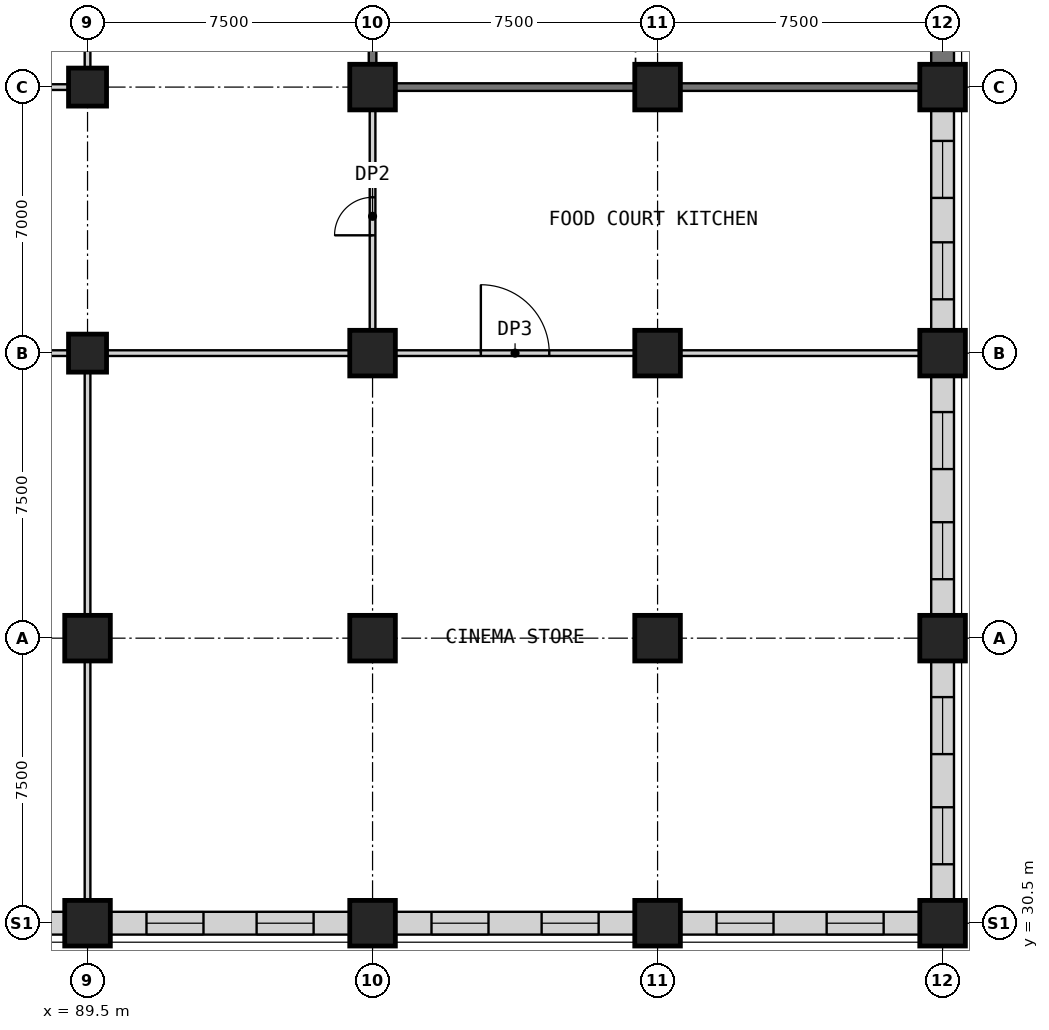
"""IFC4 building model, lengths in metres.
Left out: names, types, materials, properties, quantities, classifications, styles, units other than length and angle.
Written with IfcOpenShell. Run it as: python <this file> out.ifc"""

import sys

from ifc_helpers import new_model, si_unit, direction, frame, frame_2d, origin, origin_2d, place, context, subcontext, project, spatial, rectangle, extrude, element, fill, save


model = new_model("IFC4")
c1 = context("Model", 3, precision=1e-05, world=origin(), true_north=direction((0.0, 1.0)))
c2 = subcontext(c1, "Body", "Model", "MODEL_VIEW")
j1 = project(units=[si_unit("LENGTHUNIT", "METRE"), si_unit("PLANEANGLEUNIT", "RADIAN")], contexts=[c1])
p1 = place(None, origin())
s1 = spatial("IfcSite", under=j1, at=p1, CompositionType="ELEMENT")
p2 = place(p1, origin())
s2 = spatial("IfcBuilding", under=s1, at=p2, CompositionType="ELEMENT")
p3 = place(p2, frame((0.0, 0.0, 18.5)))
s3 = spatial("IfcBuildingStorey", under=s2, at=p3, CompositionType="ELEMENT", Elevation=18.5)
for number, where, z_axis, x_axis in (
    (1, (89.5, 45.5, 0.0), (0.0, 0.0, 1.0), (1.0, 0.0, 0.0)),
    (2, (89.5, 52.5, 0.0), (0.0, 0.0, 1.0), (1.0, 0.0, 0.0)),
):
    element("IfcColumn", number, at=place(p3, frame(where, z_axis=z_axis, x_axis=x_axis)), inside=s3, PredefinedType="COLUMN", context=c2, shape_type="SweptSolid", body=[
        extrude(rectangle(XDim=1.0, YDim=1.0, at=origin_2d()), origin(), (0.0, 0.0, 1.0), 5.0),
    ])
for number, where, z_axis, x_axis in (
    (3, (89.5, 30.5, 0.0), (0.0, 0.0, 1.0), (1.0, 0.0, 0.0)),
    (4, (89.5, 38.0, 0.0), (0.0, 0.0, 1.0), (1.0, 0.0, 0.0)),
    (5, (97.0, 30.5, 0.0), (0.0, 0.0, 1.0), (1.0, 0.0, 0.0)),
    (6, (97.0, 38.0, 0.0), (0.0, 0.0, 1.0), (1.0, 0.0, 0.0)),
    (7, (97.0, 45.5, 0.0), (0.0, 0.0, 1.0), (1.0, 0.0, 0.0)),
    (8, (97.0, 52.5, 0.0), (0.0, 0.0, 1.0), (1.0, 0.0, 0.0)),
    (9, (104.5, 30.5, 0.0), (0.0, 0.0, 1.0), (1.0, 0.0, 0.0)),
    (10, (104.5, 38.0, 0.0), (0.0, 0.0, 1.0), (1.0, 0.0, 0.0)),
    (11, (104.5, 45.5, 0.0), (0.0, 0.0, 1.0), (1.0, 0.0, 0.0)),
    (12, (104.5, 52.5, 0.0), (0.0, 0.0, 1.0), (1.0, 0.0, 0.0)),
    (13, (112.0, 30.5, 0.0), (0.0, 0.0, 1.0), (1.0, 0.0, 0.0)),
    (14, (112.0, 38.0, 0.0), (0.0, 0.0, 1.0), (1.0, 0.0, 0.0)),
    (15, (112.0, 45.5, 0.0), (0.0, 0.0, 1.0), (1.0, 0.0, 0.0)),
    (16, (112.0, 52.5, 0.0), (0.0, 0.0, 1.0), (1.0, 0.0, 0.0)),
):
    element("IfcColumn", number, at=place(p3, frame(where, z_axis=z_axis, x_axis=x_axis)), inside=s3, PredefinedType="COLUMN", context=c2, shape_type="SweptSolid", body=[
        extrude(rectangle(XDim=1.2, YDim=1.2, at=origin_2d()), origin(), (0.0, 0.0, 1.0), 5.0),
    ])
p4 = place(p3, frame((82.6, 30.5, 0.0), z_axis=(0.0, 0.0, 1.0), x_axis=(1.0, 0.0, 0.0)))
e17 = element("IfcWall", 17, at=p4, inside=s3, PredefinedType="PARTITIONING", context=c2, shape_type="SweptSolid", body=[
    extrude(rectangle(XDim=6.3, YDim=0.6, at=frame_2d((3.15, 0.0))), origin(), (0.0, 0.0, 1.0), 4.1),
])
p5 = place(p4, frame((0.951, 0.0, 0.9)))
e18 = element("IfcOpeningElement", 18, at=p5, cuts=e17, PredefinedType="OPENING", context=c2, shape_type="SweptSolid", body=[
    extrude(rectangle(XDim=1.5, YDim=2.8, at=frame_2d((0.75, 1.4))), frame((0.0, 0.31, 0.0), z_axis=(0.0, -1.0, 0.0), x_axis=(1.0, 0.0, 0.0)), (0.0, 0.0, 1.0), 0.62),
])
p6 = place(p4, frame((3.849, 0.0, 0.9)))
e19 = element("IfcOpeningElement", 19, at=p6, cuts=e17, PredefinedType="OPENING", context=c2, shape_type="SweptSolid", body=[
    extrude(rectangle(XDim=1.5, YDim=2.8, at=frame_2d((0.75, 1.4))), frame((0.0, 0.31, 0.0), z_axis=(0.0, -1.0, 0.0), x_axis=(1.0, 0.0, 0.0)), (0.0, 0.0, 1.0), 0.62),
])
p7 = place(p3, frame((90.1, 30.5, 0.0), z_axis=(0.0, 0.0, 1.0), x_axis=(1.0, 0.0, 0.0)))
e20 = element("IfcWall", 20, at=p7, inside=s3, PredefinedType="PARTITIONING", context=c2, shape_type="SweptSolid", body=[
    extrude(rectangle(XDim=6.3, YDim=0.6, at=frame_2d((3.15, 0.0))), origin(), (0.0, 0.0, 1.0), 4.1),
])
p8 = place(p7, frame((0.951, 0.0, 0.9)))
e21 = element("IfcOpeningElement", 21, at=p8, cuts=e20, PredefinedType="OPENING", context=c2, shape_type="SweptSolid", body=[
    extrude(rectangle(XDim=1.5, YDim=2.8, at=frame_2d((0.75, 1.4))), frame((0.0, 0.31, 0.0), z_axis=(0.0, -1.0, 0.0), x_axis=(1.0, 0.0, 0.0)), (0.0, 0.0, 1.0), 0.62),
])
p9 = place(p7, frame((3.849, 0.0, 0.9)))
e22 = element("IfcOpeningElement", 22, at=p9, cuts=e20, PredefinedType="OPENING", context=c2, shape_type="SweptSolid", body=[
    extrude(rectangle(XDim=1.5, YDim=2.8, at=frame_2d((0.75, 1.4))), frame((0.0, 0.31, 0.0), z_axis=(0.0, -1.0, 0.0), x_axis=(1.0, 0.0, 0.0)), (0.0, 0.0, 1.0), 0.62),
])
p10 = place(p3, frame((97.6, 30.5, 0.0), z_axis=(0.0, 0.0, 1.0), x_axis=(1.0, 0.0, 0.0)))
e23 = element("IfcWall", 23, at=p10, inside=s3, PredefinedType="PARTITIONING", context=c2, shape_type="SweptSolid", body=[
    extrude(rectangle(XDim=6.3, YDim=0.6, at=frame_2d((3.15, 0.0))), origin(), (0.0, 0.0, 1.0), 4.1),
])
p11 = place(p10, frame((0.951, 0.0, 0.9)))
e24 = element("IfcOpeningElement", 24, at=p11, cuts=e23, PredefinedType="OPENING", context=c2, shape_type="SweptSolid", body=[
    extrude(rectangle(XDim=1.5, YDim=2.8, at=frame_2d((0.75, 1.4))), frame((0.0, 0.31, 0.0), z_axis=(0.0, -1.0, 0.0), x_axis=(1.0, 0.0, 0.0)), (0.0, 0.0, 1.0), 0.62),
])
p12 = place(p10, frame((3.849, 0.0, 0.9)))
e25 = element("IfcOpeningElement", 25, at=p12, cuts=e23, PredefinedType="OPENING", context=c2, shape_type="SweptSolid", body=[
    extrude(rectangle(XDim=1.5, YDim=2.8, at=frame_2d((0.75, 1.4))), frame((0.0, 0.31, 0.0), z_axis=(0.0, -1.0, 0.0), x_axis=(1.0, 0.0, 0.0)), (0.0, 0.0, 1.0), 0.62),
])
p13 = place(p3, frame((105.1, 30.5, 0.0), z_axis=(0.0, 0.0, 1.0), x_axis=(1.0, 0.0, 0.0)))
e26 = element("IfcWall", 26, at=p13, inside=s3, PredefinedType="PARTITIONING", context=c2, shape_type="SweptSolid", body=[
    extrude(rectangle(XDim=6.3, YDim=0.6, at=frame_2d((3.15, 0.0))), origin(), (0.0, 0.0, 1.0), 4.1),
])
p14 = place(p13, frame((0.951, 0.0, 0.9)))
e27 = element("IfcOpeningElement", 27, at=p14, cuts=e26, PredefinedType="OPENING", context=c2, shape_type="SweptSolid", body=[
    extrude(rectangle(XDim=1.5, YDim=2.8, at=frame_2d((0.75, 1.4))), frame((0.0, 0.31, 0.0), z_axis=(0.0, -1.0, 0.0), x_axis=(1.0, 0.0, 0.0)), (0.0, 0.0, 1.0), 0.62),
])
p15 = place(p13, frame((3.849, 0.0, 0.9)))
e28 = element("IfcOpeningElement", 28, at=p15, cuts=e26, PredefinedType="OPENING", context=c2, shape_type="SweptSolid", body=[
    extrude(rectangle(XDim=1.5, YDim=2.8, at=frame_2d((0.75, 1.4))), frame((0.0, 0.31, 0.0), z_axis=(0.0, -1.0, 0.0), x_axis=(1.0, 0.0, 0.0)), (0.0, 0.0, 1.0), 0.62),
])
for number, where, z_axis, x_axis in (
    (29, (82.6, 45.5, 0.0), (0.0, 0.0, 1.0), (1.0, 0.0, 0.0)),
    (30, (90.0, 45.5, 0.0), (0.0, 0.0, 1.0), (1.0, 0.0, 0.0)),
):
    element("IfcWall", number, at=place(p3, frame(where, z_axis=z_axis, x_axis=x_axis)), inside=s3, PredefinedType="PARTITIONING", context=c2, shape_type="SweptSolid", body=[
        extrude(rectangle(XDim=6.4, YDim=0.15, at=frame_2d((3.2, 0.0))), origin(), (0.0, 0.0, 1.0), 4.7),
    ])
p16 = place(p3, frame((97.6, 45.5, 0.0), z_axis=(0.0, 0.0, 1.0), x_axis=(1.0, 0.0, 0.0)))
e31 = element("IfcWall", 31, at=p16, inside=s3, PredefinedType="PARTITIONING", context=c2, shape_type="SweptSolid", body=[
    extrude(rectangle(XDim=6.3, YDim=0.15, at=frame_2d((3.15, 0.0))), origin(), (0.0, 0.0, 1.0), 4.7),
])
p17 = place(p16, frame((2.25, 0.0, 0.0)))
e32 = element("IfcOpeningElement", 32, at=p17, cuts=e31, PredefinedType="OPENING", context=c2, shape_type="SweptSolid", body=[
    extrude(rectangle(XDim=1.8, YDim=2.4, at=frame_2d((0.9, 1.2))), frame((0.0, 0.085, 0.0), z_axis=(0.0, -1.0, 0.0), x_axis=(1.0, 0.0, 0.0)), (0.0, 0.0, 1.0), 0.17),
])
p18 = place(p3, frame((105.1, 45.5, 0.0), z_axis=(0.0, 0.0, 1.0), x_axis=(1.0, 0.0, 0.0)))
e33 = element("IfcWall", 33, at=p18, inside=s3, PredefinedType="PARTITIONING", context=c2, shape_type="SweptSolid", body=[
    extrude(rectangle(XDim=6.3, YDim=0.15, at=frame_2d((3.15, 0.0))), origin(), (0.0, 0.0, 1.0), 4.7),
])
p19 = place(p3, frame((89.0, 52.5, 0.0), z_axis=(0.0, 0.0, 1.0), x_axis=(-1.0, 0.0, 0.0)))
e34 = element("IfcWall", 34, at=p19, inside=s3, PredefinedType="PARTITIONING", context=c2, shape_type="SweptSolid", body=[
    extrude(rectangle(XDim=6.4, YDim=0.15, at=frame_2d((3.2, 0.0))), origin(), (0.0, 0.0, 1.0), 4.7),
])
p20 = place(p19, frame((4.1, 0.0, 0.0)))
e35 = element("IfcOpeningElement", 35, at=p20, cuts=e34, PredefinedType="OPENING", context=c2, shape_type="SweptSolid", body=[
    extrude(rectangle(XDim=1.8, YDim=2.4, at=frame_2d((0.9, 1.2))), frame((0.0, 0.085, 0.0), z_axis=(0.0, -1.0, 0.0), x_axis=(1.0, 0.0, 0.0)), (0.0, 0.0, 1.0), 0.17),
])
for number, where, z_axis, x_axis in (
    (36, (97.6, 52.5, 0.0), (0.0, 0.0, 1.0), (1.0, 0.0, 0.0)),
    (37, (105.1, 52.5, 0.0), (0.0, 0.0, 1.0), (1.0, 0.0, 0.0)),
):
    element("IfcWall", number, at=place(p3, frame(where, z_axis=z_axis, x_axis=x_axis)), inside=s3, PredefinedType="SHEAR", context=c2, shape_type="SweptSolid", body=[
        extrude(rectangle(XDim=6.3, YDim=0.2, at=frame_2d((3.15, 0.0))), origin(), (0.0, 0.0, 1.0), 4.7),
    ])
p21 = place(p3, frame((97.0, 46.1, 0.0), z_axis=(0.0, 0.0, 1.0), x_axis=(0.0, 1.0, 0.0)))
e38 = element("IfcWall", 38, at=p21, inside=s3, PredefinedType="PARTITIONING", context=c2, shape_type="SweptSolid", body=[
    extrude(rectangle(XDim=5.8, YDim=0.15, at=frame_2d((2.9, 0.0))), origin(), (0.0, 0.0, 1.0), 4.7),
])
p22 = place(p21, frame((2.5, 0.0, 0.0)))
e39 = element("IfcOpeningElement", 39, at=p22, cuts=e38, PredefinedType="OPENING", context=c2, shape_type="SweptSolid", body=[
    extrude(rectangle(XDim=1.0, YDim=2.1, at=frame_2d((0.5, 1.05))), frame((0.0, 0.085, 0.0), z_axis=(0.0, -1.0, 0.0), x_axis=(1.0, 0.0, 0.0)), (0.0, 0.0, 1.0), 0.17),
])
p23 = place(p3, frame((97.0, 59.4, 0.0), z_axis=(0.0, 0.0, 1.0), x_axis=(0.0, -1.0, 0.0)))
e40 = element("IfcWall", 40, at=p23, inside=s3, PredefinedType="SHEAR", context=c2, shape_type="SweptSolid", body=[
    extrude(rectangle(XDim=6.3, YDim=0.2, at=frame_2d((3.15, 0.0))), origin(), (0.0, 0.0, 1.0), 4.7),
])
p24 = place(p23, frame((2.6, 0.0, 0.0)))
e41 = element("IfcOpeningElement", 41, at=p24, cuts=e40, PredefinedType="OPENING", context=c2, shape_type="SweptSolid", body=[
    extrude(rectangle(XDim=1.2, YDim=2.1, at=frame_2d((0.6, 1.05))), frame((0.0, 0.11, 0.0), z_axis=(0.0, -1.0, 0.0), x_axis=(1.0, 0.0, 0.0)), (0.0, 0.0, 1.0), 0.22),
])
p25 = place(p3, frame((112.0, 31.1, 0.0), z_axis=(0.0, 0.0, 1.0), x_axis=(0.0, 1.0, 0.0)))
e42 = element("IfcWall", 42, at=p25, inside=s3, PredefinedType="PARTITIONING", context=c2, shape_type="SweptSolid", body=[
    extrude(rectangle(XDim=6.3, YDim=0.6, at=frame_2d((3.15, 0.0))), origin(), (0.0, 0.0, 1.0), 4.1),
])
p26 = place(p25, frame((0.951, 0.0, 0.9)))
e43 = element("IfcOpeningElement", 43, at=p26, cuts=e42, PredefinedType="OPENING", context=c2, shape_type="SweptSolid", body=[
    extrude(rectangle(XDim=1.5, YDim=2.8, at=frame_2d((0.75, 1.4))), frame((0.0, 0.31, 0.0), z_axis=(0.0, -1.0, 0.0), x_axis=(1.0, 0.0, 0.0)), (0.0, 0.0, 1.0), 0.62),
])
p27 = place(p25, frame((3.849, 0.0, 0.9)))
e44 = element("IfcOpeningElement", 44, at=p27, cuts=e42, PredefinedType="OPENING", context=c2, shape_type="SweptSolid", body=[
    extrude(rectangle(XDim=1.5, YDim=2.8, at=frame_2d((0.75, 1.4))), frame((0.0, 0.31, 0.0), z_axis=(0.0, -1.0, 0.0), x_axis=(1.0, 0.0, 0.0)), (0.0, 0.0, 1.0), 0.62),
])
p28 = place(p3, frame((112.0, 38.6, 0.0), z_axis=(0.0, 0.0, 1.0), x_axis=(0.0, 1.0, 0.0)))
e45 = element("IfcWall", 45, at=p28, inside=s3, PredefinedType="PARTITIONING", context=c2, shape_type="SweptSolid", body=[
    extrude(rectangle(XDim=6.3, YDim=0.6, at=frame_2d((3.15, 0.0))), origin(), (0.0, 0.0, 1.0), 4.1),
])
p29 = place(p28, frame((0.951, 0.0, 0.9)))
e46 = element("IfcOpeningElement", 46, at=p29, cuts=e45, PredefinedType="OPENING", context=c2, shape_type="SweptSolid", body=[
    extrude(rectangle(XDim=1.5, YDim=2.8, at=frame_2d((0.75, 1.4))), frame((0.0, 0.31, 0.0), z_axis=(0.0, -1.0, 0.0), x_axis=(1.0, 0.0, 0.0)), (0.0, 0.0, 1.0), 0.62),
])
p30 = place(p28, frame((3.849, 0.0, 0.9)))
e47 = element("IfcOpeningElement", 47, at=p30, cuts=e45, PredefinedType="OPENING", context=c2, shape_type="SweptSolid", body=[
    extrude(rectangle(XDim=1.5, YDim=2.8, at=frame_2d((0.75, 1.4))), frame((0.0, 0.31, 0.0), z_axis=(0.0, -1.0, 0.0), x_axis=(1.0, 0.0, 0.0)), (0.0, 0.0, 1.0), 0.62),
])
p31 = place(p3, frame((112.0, 46.1, 0.0), z_axis=(0.0, 0.0, 1.0), x_axis=(0.0, 1.0, 0.0)))
e48 = element("IfcWall", 48, at=p31, inside=s3, PredefinedType="PARTITIONING", context=c2, shape_type="SweptSolid", body=[
    extrude(rectangle(XDim=5.8, YDim=0.6, at=frame_2d((2.9, 0.0))), origin(), (0.0, 0.0, 1.0), 4.1),
])
p32 = place(p31, frame((0.816, 0.0, 0.9)))
e49 = element("IfcOpeningElement", 49, at=p32, cuts=e48, PredefinedType="OPENING", context=c2, shape_type="SweptSolid", body=[
    extrude(rectangle(XDim=1.5, YDim=2.8, at=frame_2d((0.75, 1.4))), frame((0.0, 0.31, 0.0), z_axis=(0.0, -1.0, 0.0), x_axis=(1.0, 0.0, 0.0)), (0.0, 0.0, 1.0), 0.62),
])
p33 = place(p31, frame((3.484, 0.0, 0.9)))
e50 = element("IfcOpeningElement", 50, at=p33, cuts=e48, PredefinedType="OPENING", context=c2, shape_type="SweptSolid", body=[
    extrude(rectangle(XDim=1.5, YDim=2.8, at=frame_2d((0.75, 1.4))), frame((0.0, 0.31, 0.0), z_axis=(0.0, -1.0, 0.0), x_axis=(1.0, 0.0, 0.0)), (0.0, 0.0, 1.0), 0.62),
])
p34 = place(p3, frame((112.0, 53.1, 0.0), z_axis=(0.0, 0.0, 1.0), x_axis=(0.0, 1.0, 0.0)))
e51 = element("IfcWall", 51, at=p34, inside=s3, PredefinedType="PARTITIONING", context=c2, shape_type="SweptSolid", body=[
    extrude(rectangle(XDim=6.3, YDim=0.6, at=frame_2d((3.15, 0.0))), origin(), (0.0, 0.0, 1.0), 4.1),
])
p35 = place(p3, frame((89.5, 31.1, 0.0), z_axis=(0.0, 0.0, 1.0), x_axis=(0.0, 1.0, 0.0)))
e52 = element("IfcWall", 52, at=p35, inside=s3, PredefinedType="PARTITIONING", context=c2, shape_type="SweptSolid", body=[
    extrude(rectangle(XDim=6.3, YDim=0.15, at=frame_2d((3.15, 0.0))), origin(), (0.0, 0.0, 1.0), 4.7),
])
p36 = place(p3, frame((89.5, 38.6, 0.0), z_axis=(0.0, 0.0, 1.0), x_axis=(0.0, 1.0, 0.0)))
e53 = element("IfcWall", 53, at=p36, inside=s3, PredefinedType="PARTITIONING", context=c2, shape_type="SweptSolid", body=[
    extrude(rectangle(XDim=6.4, YDim=0.15, at=frame_2d((3.2, 0.0))), origin(), (0.0, 0.0, 1.0), 4.7),
])
p37 = place(p3, frame((89.5, 53.0, 0.0), z_axis=(0.0, 0.0, 1.0), x_axis=(0.0, 1.0, 0.0)))
e54 = element("IfcWall", 54, at=p37, inside=s3, PredefinedType="PARTITIONING", context=c2, shape_type="SweptSolid", body=[
    extrude(rectangle(XDim=6.5, YDim=0.15, at=frame_2d((3.25, 0.0))), origin(), (0.0, 0.0, 1.0), 4.7),
])
p38 = place(p8, origin())
e55 = element("IfcWindow", 55, at=p38, inside=s3, PartitioningType="SINGLE_PANEL", PredefinedType="WINDOW", context=c2, shape_type="SweptSolid", body=[
    extrude(rectangle(XDim=1.5, YDim=2.8, at=frame_2d((0.75, 1.4))), frame((0.0, 0.03, 0.0), z_axis=(0.0, -1.0, 0.0), x_axis=(1.0, 0.0, 0.0)), (0.0, 0.0, 1.0), 0.06),
])
fill(e21, e55)
p39 = place(p9, origin())
e56 = element("IfcWindow", 56, at=p39, inside=s3, PartitioningType="SINGLE_PANEL", PredefinedType="WINDOW", context=c2, shape_type="SweptSolid", body=[
    extrude(rectangle(XDim=1.5, YDim=2.8, at=frame_2d((0.75, 1.4))), frame((0.0, 0.03, 0.0), z_axis=(0.0, -1.0, 0.0), x_axis=(1.0, 0.0, 0.0)), (0.0, 0.0, 1.0), 0.06),
])
fill(e22, e56)
p40 = place(p11, origin())
e57 = element("IfcWindow", 57, at=p40, inside=s3, PartitioningType="SINGLE_PANEL", PredefinedType="WINDOW", context=c2, shape_type="SweptSolid", body=[
    extrude(rectangle(XDim=1.5, YDim=2.8, at=frame_2d((0.75, 1.4))), frame((0.0, 0.03, 0.0), z_axis=(0.0, -1.0, 0.0), x_axis=(1.0, 0.0, 0.0)), (0.0, 0.0, 1.0), 0.06),
])
fill(e24, e57)
p41 = place(p12, origin())
e58 = element("IfcWindow", 58, at=p41, inside=s3, PartitioningType="SINGLE_PANEL", PredefinedType="WINDOW", context=c2, shape_type="SweptSolid", body=[
    extrude(rectangle(XDim=1.5, YDim=2.8, at=frame_2d((0.75, 1.4))), frame((0.0, 0.03, 0.0), z_axis=(0.0, -1.0, 0.0), x_axis=(1.0, 0.0, 0.0)), (0.0, 0.0, 1.0), 0.06),
])
fill(e25, e58)
p42 = place(p14, origin())
e59 = element("IfcWindow", 59, at=p42, inside=s3, PartitioningType="SINGLE_PANEL", PredefinedType="WINDOW", context=c2, shape_type="SweptSolid", body=[
    extrude(rectangle(XDim=1.5, YDim=2.8, at=frame_2d((0.75, 1.4))), frame((0.0, 0.03, 0.0), z_axis=(0.0, -1.0, 0.0), x_axis=(1.0, 0.0, 0.0)), (0.0, 0.0, 1.0), 0.06),
])
fill(e27, e59)
p43 = place(p15, origin())
e60 = element("IfcWindow", 60, at=p43, inside=s3, PartitioningType="SINGLE_PANEL", PredefinedType="WINDOW", context=c2, shape_type="SweptSolid", body=[
    extrude(rectangle(XDim=1.5, YDim=2.8, at=frame_2d((0.75, 1.4))), frame((0.0, 0.03, 0.0), z_axis=(0.0, -1.0, 0.0), x_axis=(1.0, 0.0, 0.0)), (0.0, 0.0, 1.0), 0.06),
])
fill(e28, e60)
p44 = place(p17, origin())
e61 = element("IfcDoor", 61, at=p44, inside=s3, OperationType="SINGLE_SWING_LEFT", PredefinedType="DOOR", context=c2, shape_type="SweptSolid", body=[
    extrude(rectangle(XDim=1.8, YDim=2.4, at=frame_2d((0.9, 1.2))), frame((0.0, 0.025, 0.0), z_axis=(0.0, -1.0, 0.0), x_axis=(1.0, 0.0, 0.0)), (0.0, 0.0, 1.0), 0.05),
])
fill(e32, e61)
p45 = place(p22, origin())
e62 = element("IfcDoor", 62, at=p45, inside=s3, OperationType="SINGLE_SWING_LEFT", PredefinedType="DOOR", context=c2, shape_type="SweptSolid", body=[
    extrude(rectangle(XDim=1.0, YDim=2.1, at=frame_2d((0.5, 1.05))), frame((0.0, 0.025, 0.0), z_axis=(0.0, -1.0, 0.0), x_axis=(1.0, 0.0, 0.0)), (0.0, 0.0, 1.0), 0.05),
])
fill(e39, e62)
p46 = place(p26, origin())
e63 = element("IfcWindow", 63, at=p46, inside=s3, PartitioningType="SINGLE_PANEL", PredefinedType="WINDOW", context=c2, shape_type="SweptSolid", body=[
    extrude(rectangle(XDim=1.5, YDim=2.8, at=frame_2d((0.75, 1.4))), frame((0.0, 0.03, 0.0), z_axis=(0.0, -1.0, 0.0), x_axis=(1.0, 0.0, 0.0)), (0.0, 0.0, 1.0), 0.06),
])
fill(e43, e63)
p47 = place(p27, origin())
e64 = element("IfcWindow", 64, at=p47, inside=s3, PartitioningType="SINGLE_PANEL", PredefinedType="WINDOW", context=c2, shape_type="SweptSolid", body=[
    extrude(rectangle(XDim=1.5, YDim=2.8, at=frame_2d((0.75, 1.4))), frame((0.0, 0.03, 0.0), z_axis=(0.0, -1.0, 0.0), x_axis=(1.0, 0.0, 0.0)), (0.0, 0.0, 1.0), 0.06),
])
fill(e44, e64)
p48 = place(p29, origin())
e65 = element("IfcWindow", 65, at=p48, inside=s3, PartitioningType="SINGLE_PANEL", PredefinedType="WINDOW", context=c2, shape_type="SweptSolid", body=[
    extrude(rectangle(XDim=1.5, YDim=2.8, at=frame_2d((0.75, 1.4))), frame((0.0, 0.03, 0.0), z_axis=(0.0, -1.0, 0.0), x_axis=(1.0, 0.0, 0.0)), (0.0, 0.0, 1.0), 0.06),
])
fill(e46, e65)
p49 = place(p30, origin())
e66 = element("IfcWindow", 66, at=p49, inside=s3, PartitioningType="SINGLE_PANEL", PredefinedType="WINDOW", context=c2, shape_type="SweptSolid", body=[
    extrude(rectangle(XDim=1.5, YDim=2.8, at=frame_2d((0.75, 1.4))), frame((0.0, 0.03, 0.0), z_axis=(0.0, -1.0, 0.0), x_axis=(1.0, 0.0, 0.0)), (0.0, 0.0, 1.0), 0.06),
])
fill(e47, e66)
p50 = place(p32, origin())
e67 = element("IfcWindow", 67, at=p50, inside=s3, PartitioningType="SINGLE_PANEL", PredefinedType="WINDOW", context=c2, shape_type="SweptSolid", body=[
    extrude(rectangle(XDim=1.5, YDim=2.8, at=frame_2d((0.75, 1.4))), frame((0.0, 0.03, 0.0), z_axis=(0.0, -1.0, 0.0), x_axis=(1.0, 0.0, 0.0)), (0.0, 0.0, 1.0), 0.06),
])
fill(e49, e67)
p51 = place(p33, origin())
e68 = element("IfcWindow", 68, at=p51, inside=s3, PartitioningType="SINGLE_PANEL", PredefinedType="WINDOW", context=c2, shape_type="SweptSolid", body=[
    extrude(rectangle(XDim=1.5, YDim=2.8, at=frame_2d((0.75, 1.4))), frame((0.0, 0.03, 0.0), z_axis=(0.0, -1.0, 0.0), x_axis=(1.0, 0.0, 0.0)), (0.0, 0.0, 1.0), 0.06),
])
fill(e50, e68)
save(model, sys.argv[1])
